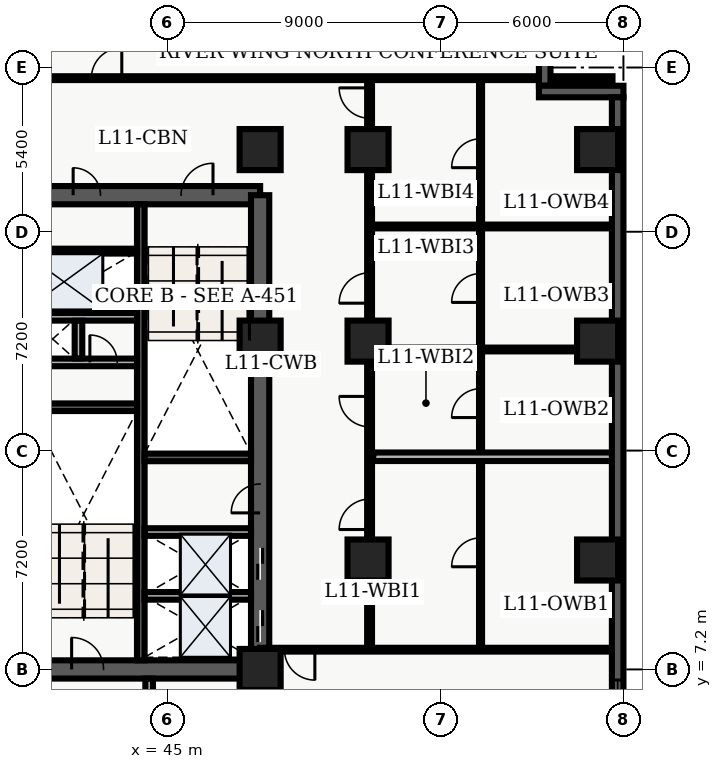
"""IFC4 building model, lengths in metres.
Left out: names, types, materials, properties, quantities, classifications, styles, units other than length and angle.
Written with IfcOpenShell. Run it as: python <this file> out.ifc"""

import sys

from ifc_helpers import new_model, entity, si_unit, converted_unit, direction, frame, origin_with_axes, origin_2d_with_axis, place, context, subcontext, project, spatial, polyline, rectangle, outline, extrude, element, fill, save


model = new_model("IFC4")
c1 = context("Model", 3, precision=1e-05, world=origin_with_axes(), true_north=direction((0.0, 1.0)))
c2 = subcontext(c1, "Body", "Model", "MODEL_VIEW")
j1 = project(units=[si_unit("LENGTHUNIT", "METRE"), converted_unit("PLANEANGLEUNIT", "DEGREE", entity("IfcPlaneAngleMeasure", 0.017), si_unit("PLANEANGLEUNIT", "RADIAN"), dimensions=[0, 0, 0, 0, 0, 0, 0])], contexts=[c1])
p1 = place(None, origin_with_axes())
s1 = spatial("IfcSite", under=j1, at=p1, CompositionType="ELEMENT")
p2 = place(p1, origin_with_axes())
s2 = spatial("IfcBuilding", under=s1, at=p2, CompositionType="ELEMENT")
p3 = place(p2, frame((0.0, 0.0, 48.3), z_axis=(0.0, 0.0, 1.0), x_axis=(1.0, 0.0, 0.0)))
s3 = spatial("IfcBuildingStorey", under=s2, at=p3, CompositionType="ELEMENT", Elevation=48.3)
p4 = place(p3, frame((40.2, 7.2, 0.0), z_axis=(0.0, 0.0, 1.0), x_axis=(1.0, 0.0, 0.0)))
e1 = element("IfcWall", 1, at=p4, inside=s3, PredefinedType="SHEAR", context=c2, shape_type="SweptSolid", body=[
    extrude(outline(polyline([(0.0, -0.3), (7.85, -0.3), (7.85, 0.3), (0.0, 0.3), (0.0, -0.3)])), origin_with_axes(), (0.0, 0.0, 1.0), 3.66),
])
p5 = place(p4, frame((2.175, 0.0, 0.0), z_axis=(0.0, 0.0, 1.0), x_axis=(1.0, 0.0, 0.0)))
e2 = element("IfcOpeningElement", 2, at=p5, cuts=e1, PredefinedType="OPENING", context=c2, shape_type="SweptSolid", body=[
    extrude(rectangle(XDim=1.05, YDim=0.62, at=origin_2d_with_axis()), origin_with_axes(), (0.0, 0.0, 1.0), 2.15),
])
p6 = place(p3, frame((40.2, 22.8, 0.0), z_axis=(0.0, 0.0, 1.0), x_axis=(1.0, 0.0, 0.0)))
e3 = element("IfcWall", 3, at=p6, inside=s3, PredefinedType="SHEAR", context=c2, shape_type="SweptSolid", body=[
    extrude(outline(polyline([(0.0, -0.3), (7.85, -0.3), (7.85, 0.3), (0.0, 0.3), (0.0, -0.3)])), origin_with_axes(), (0.0, 0.0, 1.0), 3.66),
])
p7 = place(p6, frame((5.775, 0.0, 0.0), z_axis=(0.0, 0.0, 1.0), x_axis=(1.0, 0.0, 0.0)))
e4 = element("IfcOpeningElement", 4, at=p7, cuts=e3, PredefinedType="OPENING", context=c2, shape_type="SweptSolid", body=[
    extrude(rectangle(XDim=1.05, YDim=0.62, at=origin_2d_with_axis()), origin_with_axes(), (0.0, 0.0, 1.0), 2.15),
])
p8 = place(p6, frame((2.15, 0.0, 0.0), z_axis=(0.0, 0.0, 1.0), x_axis=(1.0, 0.0, 0.0)))
e5 = element("IfcOpeningElement", 5, at=p8, cuts=e3, PredefinedType="OPENING", context=c2, shape_type="SweptSolid", body=[
    extrude(rectangle(XDim=0.9, YDim=0.62, at=origin_2d_with_axis()), origin_with_axes(), (0.0, 0.0, 1.0), 2.15),
])
p9 = place(p3, frame((48.05, 7.2, 0.0), z_axis=(0.0, 0.0, 1.0), x_axis=(0.0, 1.0, 0.0)))
e6 = element("IfcWall", 6, at=p9, inside=s3, PredefinedType="SHEAR", context=c2, shape_type="SweptSolid", body=[
    extrude(outline(polyline([(0.0, -0.3), (15.6, -0.3), (15.6, 0.3), (0.0, 0.3), (0.0, -0.3)])), origin_with_axes(), (0.0, 0.0, 1.0), 3.66),
])
p10 = place(p9, frame((1.425, 0.0, 0.0), z_axis=(0.0, 0.0, 1.0), x_axis=(1.0, 0.0, 0.0)))
e7 = element("IfcOpeningElement", 7, at=p10, cuts=e6, PredefinedType="OPENING", context=c2, shape_type="SweptSolid", body=[
    extrude(rectangle(XDim=1.05, YDim=0.62, at=origin_2d_with_axis()), origin_with_axes(), (0.0, 0.0, 1.0), 2.15),
])
p11 = place(p9, frame((3.475, 0.0, 0.0), z_axis=(0.0, 0.0, 1.0), x_axis=(1.0, 0.0, 0.0)))
e8 = element("IfcOpeningElement", 8, at=p11, cuts=e6, PredefinedType="OPENING", context=c2, shape_type="SweptSolid", body=[
    extrude(rectangle(XDim=1.05, YDim=0.62, at=origin_2d_with_axis()), origin_with_axes(), (0.0, 0.0, 1.0), 2.15),
])
p12 = place(p9, frame((5.625, 0.0, 0.0), z_axis=(0.0, 0.0, 1.0), x_axis=(1.0, 0.0, 0.0)))
e9 = element("IfcOpeningElement", 9, at=p12, cuts=e6, PredefinedType="OPENING", context=c2, shape_type="SweptSolid", body=[
    extrude(rectangle(XDim=0.95, YDim=0.62, at=origin_2d_with_axis()), origin_with_axes(), (0.0, 0.0, 1.0), 2.15),
])
p13 = place(p3, frame((44.125, 7.5, 0.0), z_axis=(0.0, 0.0, 1.0), x_axis=(0.0, 1.0, 0.0)))
e10 = element("IfcWall", 10, at=p13, inside=s3, PredefinedType="SHEAR", context=c2, shape_type="SweptSolid", body=[
    extrude(outline(polyline([(0.0, -0.125), (15.0, -0.125), (15.0, 0.125), (0.0, 0.125), (0.0, -0.125)])), origin_with_axes(), (0.0, 0.0, 1.0), 3.66),
])
for number, where, z_axis, x_axis in (
    (11, (40.5, 15.825, 0.0), (0.0, 0.0, 1.0), (1.0, 0.0, 0.0)),
    (12, (44.25, 14.175, 0.0), (0.0, 0.0, 1.0), (1.0, 0.0, 0.0)),
):
    element("IfcWall", number, at=place(p3, frame(where, z_axis=z_axis, x_axis=x_axis)), inside=s3, PredefinedType="SHEAR", context=c2, shape_type="SweptSolid", body=[
        extrude(outline(polyline([(0.0, -0.125), (3.5, -0.125), (3.5, 0.125), (0.0, 0.125), (0.0, -0.125)])), origin_with_axes(), (0.0, 0.0, 1.0), 3.66),
    ])
p14 = place(p3, frame((40.5, 17.3, 0.0), z_axis=(0.0, 0.0, 1.0), x_axis=(1.0, 0.0, 0.0)))
e13 = element("IfcWall", 13, at=p14, inside=s3, PredefinedType="SOLIDWALL", context=c2, shape_type="SweptSolid", body=[
    extrude(outline(polyline([(0.0, -0.125), (3.5, -0.125), (3.5, 0.125), (0.0, 0.125), (0.0, -0.125)])), origin_with_axes(), (0.0, 0.0, 1.0), 2.7),
])
p15 = place(p14, frame((2.4, 0.0, 0.0), z_axis=(0.0, 0.0, 1.0), x_axis=(1.0, 0.0, 0.0)))
e14 = element("IfcOpeningElement", 14, at=p15, cuts=e13, PredefinedType="OPENING", context=c2, shape_type="SweptSolid", body=[
    extrude(rectangle(XDim=0.9, YDim=0.27, at=origin_2d_with_axis()), origin_with_axes(), (0.0, 0.0, 1.0), 2.15),
])
p16 = place(p3, frame((40.5, 18.8, 0.0), z_axis=(0.0, 0.0, 1.0), x_axis=(1.0, 0.0, 0.0)))
e15 = element("IfcWall", 15, at=p16, inside=s3, PredefinedType="SOLIDWALL", context=c2, shape_type="SweptSolid", body=[
    extrude(outline(polyline([(0.0, -0.125), (3.5, -0.125), (3.5, 0.125), (0.0, 0.125), (0.0, -0.125)])), origin_with_axes(), (0.0, 0.0, 1.0), 2.7),
])
p17 = place(p3, frame((42.075, 17.43, 0.0), z_axis=(0.0, 0.0, 1.0), x_axis=(0.0, 1.0, 0.0)))
e16 = element("IfcWall", 16, at=p17, inside=s3, PredefinedType="SOLIDWALL", context=c2, shape_type="SweptSolid", body=[
    extrude(outline(polyline([(0.0, -0.125), (1.24, -0.125), (1.24, 0.125), (0.0, 0.125), (0.0, -0.125)])), origin_with_axes(), (0.0, 0.0, 1.0), 2.7),
])
p18 = place(p3, frame((44.4, 3.1, 0.0), z_axis=(0.0, 0.0, 1.0), x_axis=(0.0, 1.0, 0.0)))
e17 = element("IfcWall", 17, at=p18, inside=s3, PredefinedType="SOLIDWALL", context=c2, shape_type="SweptSolid", body=[
    extrude(outline(polyline([(0.0, -0.125), (3.8, -0.125), (3.8, 0.125), (0.0, 0.125), (0.0, -0.125)])), origin_with_axes(), (0.0, 0.0, 1.0), 2.7),
])
for number, where, z_axis, x_axis in (
    (18, (48.05, 7.2, 0.0), (0.0, 0.0, 1.0), (1.0, 0.0, 0.0)),
    (19, (48.05, 18.0, 0.0), (0.0, 0.0, 1.0), (1.0, 0.0, 0.0)),
    (20, (48.05, 24.3, 0.0), (0.0, 0.0, 1.0), (1.0, 0.0, 0.0)),
    (21, (51.6, 10.8, 0.0), (0.0, 0.0, 1.0), (1.0, 0.0, 0.0)),
    (22, (51.6, 18.0, 0.0), (0.0, 0.0, 1.0), (1.0, 0.0, 0.0)),
    (23, (51.6, 24.3, 0.0), (0.0, 0.0, 1.0), (1.0, 0.0, 0.0)),
    (24, (59.15, 10.8, 0.0), (0.0, 0.0, 1.0), (1.0, 0.0, 0.0)),
    (25, (59.15, 18.0, 0.0), (0.0, 0.0, 1.0), (1.0, 0.0, 0.0)),
    (26, (59.15, 24.3, 0.0), (0.0, 0.0, 1.0), (1.0, 0.0, 0.0)),
):
    element("IfcColumn", number, at=place(p3, frame(where, z_axis=z_axis, x_axis=x_axis)), inside=s3, PredefinedType="COLUMN", context=c2, shape_type="SweptSolid", body=[
        extrude(rectangle(XDim=1.35, YDim=1.35, at=origin_2d_with_axis()), origin_with_axes(), (0.0, 0.0, 1.0), 3.9),
    ])
p19 = place(p3, frame((40.5, 20.96, 0.0), z_axis=(0.0, 0.0, 1.0), x_axis=(1.0, 0.0, 0.0)))
e27 = element("IfcWall", 27, at=p19, inside=s3, PredefinedType="PARTITIONING", context=c2, shape_type="SweptSolid", body=[
    extrude(outline(polyline([(0.0, -0.08), (3.5, -0.08), (3.5, 0.08), (0.0, 0.08), (0.0, -0.08)])), origin_with_axes(), (0.0, 0.0, 1.0), 2.7),
])
for number, where, z_axis, x_axis in (
    (28, (44.25, 9.62, 0.0), (0.0, 0.0, 1.0), (1.0, 0.0, 0.0)),
    (29, (44.25, 11.72, 0.0), (0.0, 0.0, 1.0), (1.0, 0.0, 0.0)),
):
    element("IfcWall", number, at=place(p3, frame(where, z_axis=z_axis, x_axis=x_axis)), inside=s3, PredefinedType="SOLIDWALL", context=c2, shape_type="SweptSolid", body=[
        extrude(outline(polyline([(0.0, -0.125), (3.5, -0.125), (3.5, 0.125), (0.0, 0.125), (0.0, -0.125)])), origin_with_axes(), (0.0, 0.0, 1.0), 2.7),
    ])
p20 = place(p3, frame((51.65, 7.85, 0.0), z_axis=(0.0, 0.0, 1.0), x_axis=(0.0, 1.0, 0.0)))
e30 = element("IfcWall", 30, at=p20, inside=s3, PredefinedType="PARTITIONING", context=c2, shape_type="SweptSolid", body=[
    extrude(outline(polyline([(0.0, -0.08), (18.8, -0.08), (18.8, 0.08), (0.0, 0.08), (0.0, -0.08)])), origin_with_axes(), (0.0, 0.0, 1.0), 2.7),
])
p21 = place(p20, frame((4.453, 0.0, 0.0), z_axis=(0.0, 0.0, 1.0), x_axis=(1.0, 0.0, 0.0)))
e31 = element("IfcOpeningElement", 31, at=p21, cuts=e30, PredefinedType="OPENING", context=c2, shape_type="SweptSolid", body=[
    extrude(rectangle(XDim=1.0, YDim=0.18, at=origin_2d_with_axis()), origin_with_axes(), (0.0, 0.0, 1.0), 2.15),
])
p22 = place(p20, frame((7.831, 0.0, 0.0), z_axis=(0.0, 0.0, 1.0), x_axis=(1.0, 0.0, 0.0)))
e32 = element("IfcOpeningElement", 32, at=p22, cuts=e30, PredefinedType="OPENING", context=c2, shape_type="SweptSolid", body=[
    extrude(rectangle(XDim=1.0, YDim=0.18, at=origin_2d_with_axis()), origin_with_axes(), (0.0, 0.0, 1.0), 2.15),
])
p23 = place(p20, frame((11.898, 0.0, 0.0), z_axis=(0.0, 0.0, 1.0), x_axis=(1.0, 0.0, 0.0)))
e33 = element("IfcOpeningElement", 33, at=p23, cuts=e30, PredefinedType="OPENING", context=c2, shape_type="SweptSolid", body=[
    extrude(rectangle(XDim=1.0, YDim=0.18, at=origin_2d_with_axis()), origin_with_axes(), (0.0, 0.0, 1.0), 2.15),
])
p24 = place(p20, frame((17.98, 0.0, 0.0), z_axis=(0.0, 0.0, 1.0), x_axis=(1.0, 0.0, 0.0)))
e34 = element("IfcOpeningElement", 34, at=p24, cuts=e30, PredefinedType="OPENING", context=c2, shape_type="SweptSolid", body=[
    extrude(rectangle(XDim=1.0, YDim=0.18, at=origin_2d_with_axis()), origin_with_axes(), (0.0, 0.0, 1.0), 2.15),
])
p25 = place(p3, frame((59.64, 7.85, 0.0), z_axis=(0.0, 0.0, 1.0), x_axis=(-1.0, 0.0, 0.0)))
e35 = element("IfcWall", 35, at=p25, inside=s3, PredefinedType="PARTITIONING", context=c2, shape_type="SweptSolid", body=[
    extrude(outline(polyline([(0.0, -0.062), (11.59, -0.062), (11.59, 0.062), (0.0, 0.062), (0.0, -0.062)])), origin_with_axes(), (0.0, 0.0, 1.0), 2.7),
])
p26 = place(p25, frame((10.29, 0.0, 0.0), z_axis=(0.0, 0.0, 1.0), x_axis=(1.0, 0.0, 0.0)))
e36 = element("IfcOpeningElement", 36, at=p26, cuts=e35, PredefinedType="OPENING", context=c2, shape_type="SweptSolid", body=[
    extrude(rectangle(XDim=1.0, YDim=0.145, at=origin_2d_with_axis()), origin_with_axes(), (0.0, 0.0, 1.0), 2.15),
])
p27 = place(p3, frame((38.76, 26.65, 0.0), z_axis=(0.0, 0.0, 1.0), x_axis=(1.0, 0.0, 0.0)))
e37 = element("IfcWall", 37, at=p27, inside=s3, PredefinedType="PARTITIONING", context=c2, shape_type="SweptSolid", body=[
    extrude(outline(polyline([(0.0, -0.062), (20.88, -0.062), (20.88, 0.062), (0.0, 0.062), (0.0, -0.062)])), origin_with_axes(), (0.0, 0.0, 1.0), 2.7),
])
p28 = place(p27, frame((4.24, 0.0, 0.0), z_axis=(0.0, 0.0, 1.0), x_axis=(1.0, 0.0, 0.0)))
e38 = element("IfcOpeningElement", 38, at=p28, cuts=e37, PredefinedType="OPENING", context=c2, shape_type="SweptSolid", body=[
    extrude(rectangle(XDim=1.0, YDim=0.145, at=origin_2d_with_axis()), origin_with_axes(), (0.0, 0.0, 1.0), 2.15),
])
p29 = place(p3, frame((55.3, 7.98, 0.0), z_axis=(0.0, 0.0, 1.0), x_axis=(0.0, 1.0, 0.0)))
e39 = element("IfcWall", 39, at=p29, inside=s3, PredefinedType="PARTITIONING", context=c2, shape_type="SweptSolid", body=[
    extrude(outline(polyline([(0.0, -0.05), (18.54, -0.05), (18.54, 0.05), (0.0, 0.05), (0.0, -0.05)])), origin_with_axes(), (0.0, 0.0, 1.0), 2.7),
])
p30 = place(p29, frame((3.073, 0.0, 0.0), z_axis=(0.0, 0.0, 1.0), x_axis=(1.0, 0.0, 0.0)))
e40 = element("IfcOpeningElement", 40, at=p30, cuts=e39, PredefinedType="OPENING", context=c2, shape_type="SweptSolid", body=[
    extrude(rectangle(XDim=0.95, YDim=0.12, at=origin_2d_with_axis()), origin_with_axes(), (0.0, 0.0, 1.0), 2.15),
])
p31 = place(p29, frame((7.981, 0.0, 0.0), z_axis=(0.0, 0.0, 1.0), x_axis=(1.0, 0.0, 0.0)))
e41 = element("IfcOpeningElement", 41, at=p31, cuts=e39, PredefinedType="OPENING", context=c2, shape_type="SweptSolid", body=[
    extrude(rectangle(XDim=0.95, YDim=0.12, at=origin_2d_with_axis()), origin_with_axes(), (0.0, 0.0, 1.0), 2.15),
])
p32 = place(p29, frame((11.768, 0.0, 0.0), z_axis=(0.0, 0.0, 1.0), x_axis=(1.0, 0.0, 0.0)))
e42 = element("IfcOpeningElement", 42, at=p32, cuts=e39, PredefinedType="OPENING", context=c2, shape_type="SweptSolid", body=[
    extrude(rectangle(XDim=0.95, YDim=0.12, at=origin_2d_with_axis()), origin_with_axes(), (0.0, 0.0, 1.0), 2.15),
])
p33 = place(p29, frame((16.201, 0.0, 0.0), z_axis=(0.0, 0.0, 1.0), x_axis=(1.0, 0.0, 0.0)))
e43 = element("IfcOpeningElement", 43, at=p33, cuts=e39, PredefinedType="OPENING", context=c2, shape_type="SweptSolid", body=[
    extrude(rectangle(XDim=0.95, YDim=0.12, at=origin_2d_with_axis()), origin_with_axes(), (0.0, 0.0, 1.0), 2.15),
])
p34 = place(p3, frame((51.77, 14.196, 0.0), z_axis=(0.0, 0.0, 1.0), x_axis=(1.0, 0.0, 0.0)))
e44 = element("IfcWall", 44, at=p34, inside=s3, PredefinedType="PARTITIONING", context=c2, shape_type="SweptSolid", body=[
    extrude(outline(polyline([(0.0, -0.14), (7.855, -0.14), (7.855, 0.14), (0.0, 0.14), (0.0, -0.14)])), origin_with_axes(), (0.0, 0.0, 1.0), 2.7),
])
for number, where, z_axis, x_axis in (
    (45, (51.77, 17.725, 0.0), (0.0, 0.0, 1.0), (1.0, 0.0, 0.0)),
    (46, (51.77, 21.771, 0.0), (0.0, 0.0, 1.0), (1.0, 0.0, 0.0)),
):
    element("IfcWall", number, at=place(p3, frame(where, z_axis=z_axis, x_axis=x_axis)), inside=s3, PredefinedType="PARTITIONING", context=c2, shape_type="SweptSolid", body=[
        extrude(outline(polyline([(0.0, -0.062), (7.855, -0.062), (7.855, 0.062), (0.0, 0.062), (0.0, -0.062)])), origin_with_axes(), (0.0, 0.0, 1.0), 2.7),
    ])
p35 = place(p3, frame((57.41, 28.42, 0.0), z_axis=(0.0, 0.0, 1.0), x_axis=(0.0, -1.0, 0.0)))
e47 = element("IfcWall", 47, at=p35, inside=s3, PredefinedType="SOLIDWALL", context=c2, shape_type="SweptSolid", body=[
    extrude(outline(polyline([(0.0, -0.19), (2.02, -0.19), (2.02, 0.19), (0.0, 0.19), (0.0, -0.19)])), origin_with_axes(), (0.0, 0.0, 1.0), 3.66),
])
p36 = place(p3, frame((57.22, 26.21, 0.0), z_axis=(0.0, 0.0, 1.0), x_axis=(1.0, 0.0, 0.0)))
e48 = element("IfcWall", 48, at=p36, inside=s3, PredefinedType="SOLIDWALL", context=c2, shape_type="SweptSolid", body=[
    extrude(outline(polyline([(0.0, -0.19), (2.78, -0.19), (2.78, 0.19), (0.0, 0.19), (0.0, -0.19)])), origin_with_axes(), (0.0, 0.0, 1.0), 3.66),
])
p37 = place(p3, frame((59.81, 26.02, 0.0), z_axis=(0.0, 0.0, 1.0), x_axis=(0.0, -1.0, 0.0)))
e49 = element("IfcWall", 49, at=p37, inside=s3, PredefinedType="SOLIDWALL", context=c2, shape_type="SweptSolid", body=[
    extrude(outline(polyline([(0.0, -0.19), (23.62, -0.19), (23.62, 0.19), (0.0, 0.19), (0.0, -0.19)])), origin_with_axes(), (0.0, 0.0, 1.0), 3.66),
])
p38 = place(p37, frame((20.218, 0.0, 0.45), z_axis=(0.0, 0.0, 1.0), x_axis=(1.0, 0.0, 0.0)))
e50 = element("IfcOpeningElement", 50, at=p38, cuts=e49, PredefinedType="OPENING", context=c2, shape_type="SweptSolid", body=[
    extrude(rectangle(XDim=2.1, YDim=0.4, at=origin_2d_with_axis()), origin_with_axes(), (0.0, 0.0, 1.0), 2.2),
])
p39 = place(p9, frame((1.425, 0.0, 0.0), z_axis=(0.0, 0.0, 1.0), x_axis=(1.0, 0.0, 0.0)))
e51 = element("IfcDoor", 51, at=p39, inside=s3, OperationType="SLIDING_TO_LEFT", PredefinedType="DOOR", context=c2, shape_type="SweptSolid", body=[
    extrude(rectangle(XDim=1.05, YDim=0.09, at=origin_2d_with_axis()), origin_with_axes(), (0.0, 0.0, 1.0), 2.15),
])
fill(e7, e51)
p40 = place(p9, frame((3.475, 0.0, 0.0), z_axis=(0.0, 0.0, 1.0), x_axis=(1.0, 0.0, 0.0)))
e52 = element("IfcDoor", 52, at=p40, inside=s3, OperationType="SLIDING_TO_RIGHT", PredefinedType="DOOR", context=c2, shape_type="SweptSolid", body=[
    extrude(rectangle(XDim=1.05, YDim=0.09, at=origin_2d_with_axis()), origin_with_axes(), (0.0, 0.0, 1.0), 2.15),
])
fill(e8, e52)
p41 = place(p14, frame((2.4, 0.0, 0.0), z_axis=(0.0, 0.0, 1.0), x_axis=(1.0, 0.0, 0.0)))
e53 = element("IfcDoor", 53, at=p41, inside=s3, OperationType="SINGLE_SWING_LEFT", PredefinedType="DOOR", context=c2, shape_type="SweptSolid", body=[
    extrude(rectangle(XDim=0.9, YDim=0.09, at=origin_2d_with_axis()), origin_with_axes(), (0.0, 0.0, 1.0), 2.15),
])
fill(e14, e53)
p42 = place(p4, frame((2.175, 0.0, 0.0), z_axis=(0.0, 0.0, 1.0), x_axis=(1.0, 0.0, 0.0)))
e54 = element("IfcDoor", 54, at=p42, inside=s3, OperationType="SINGLE_SWING_LEFT", PredefinedType="DOOR", context=c2, shape_type="SweptSolid", body=[
    extrude(rectangle(XDim=1.05, YDim=0.09, at=origin_2d_with_axis()), origin_with_axes(), (0.0, 0.0, 1.0), 2.15),
])
fill(e2, e54)
p43 = place(p6, frame((5.775, 0.0, 0.0), z_axis=(0.0, 0.0, 1.0), x_axis=(1.0, 0.0, 0.0)))
e55 = element("IfcDoor", 55, at=p43, inside=s3, OperationType="SINGLE_SWING_RIGHT", PredefinedType="DOOR", context=c2, shape_type="SweptSolid", body=[
    extrude(rectangle(XDim=1.05, YDim=0.09, at=origin_2d_with_axis()), origin_with_axes(), (0.0, 0.0, 1.0), 2.15),
])
fill(e4, e55)
p44 = place(p6, frame((2.15, 0.0, 0.0), z_axis=(0.0, 0.0, 1.0), x_axis=(1.0, 0.0, 0.0)))
e56 = element("IfcDoor", 56, at=p44, inside=s3, OperationType="SINGLE_SWING_LEFT", PredefinedType="DOOR", context=c2, shape_type="SweptSolid", body=[
    extrude(rectangle(XDim=0.9, YDim=0.09, at=origin_2d_with_axis()), origin_with_axes(), (0.0, 0.0, 1.0), 2.15),
])
fill(e5, e56)
p45 = place(p9, frame((5.625, 0.0, 0.0), z_axis=(0.0, 0.0, 1.0), x_axis=(1.0, 0.0, 0.0)))
e57 = element("IfcDoor", 57, at=p45, inside=s3, OperationType="SINGLE_SWING_LEFT", PredefinedType="DOOR", context=c2, shape_type="SweptSolid", body=[
    extrude(rectangle(XDim=0.95, YDim=0.09, at=origin_2d_with_axis()), origin_with_axes(), (0.0, 0.0, 1.0), 2.15),
])
fill(e9, e57)
p46 = place(p25, frame((10.29, 0.0, 0.0), z_axis=(0.0, 0.0, 1.0), x_axis=(1.0, 0.0, 0.0)))
e58 = element("IfcDoor", 58, at=p46, inside=s3, OperationType="SINGLE_SWING_LEFT", PredefinedType="DOOR", context=c2, shape_type="SweptSolid", body=[
    extrude(rectangle(XDim=1.0, YDim=0.075, at=origin_2d_with_axis()), origin_with_axes(), (0.0, 0.0, 1.0), 2.15),
])
fill(e36, e58)
p47 = place(p27, frame((4.24, 0.0, 0.0), z_axis=(0.0, 0.0, 1.0), x_axis=(1.0, 0.0, 0.0)))
e59 = element("IfcDoor", 59, at=p47, inside=s3, OperationType="SINGLE_SWING_RIGHT", PredefinedType="DOOR", context=c2, shape_type="SweptSolid", body=[
    extrude(rectangle(XDim=1.0, YDim=0.075, at=origin_2d_with_axis()), origin_with_axes(), (0.0, 0.0, 1.0), 2.15),
])
fill(e38, e59)
p48 = place(p29, frame((3.073, 0.0, 0.0), z_axis=(0.0, 0.0, 1.0), x_axis=(1.0, 0.0, 0.0)))
e60 = element("IfcDoor", 60, at=p48, inside=s3, OperationType="SINGLE_SWING_LEFT", PredefinedType="DOOR", context=c2, shape_type="SweptSolid", body=[
    extrude(rectangle(XDim=0.95, YDim=0.06, at=origin_2d_with_axis()), origin_with_axes(), (0.0, 0.0, 1.0), 2.15),
])
fill(e40, e60)
p49 = place(p20, frame((4.453, 0.0, 0.0), z_axis=(0.0, 0.0, 1.0), x_axis=(1.0, 0.0, 0.0)))
e61 = element("IfcDoor", 61, at=p49, inside=s3, OperationType="SINGLE_SWING_LEFT", PredefinedType="DOOR", context=c2, shape_type="SweptSolid", body=[
    extrude(rectangle(XDim=1.0, YDim=0.09, at=origin_2d_with_axis()), origin_with_axes(), (0.0, 0.0, 1.0), 2.15),
])
fill(e31, e61)
p50 = place(p29, frame((7.981, 0.0, 0.0), z_axis=(0.0, 0.0, 1.0), x_axis=(1.0, 0.0, 0.0)))
e62 = element("IfcDoor", 62, at=p50, inside=s3, OperationType="SINGLE_SWING_LEFT", PredefinedType="DOOR", context=c2, shape_type="SweptSolid", body=[
    extrude(rectangle(XDim=0.95, YDim=0.06, at=origin_2d_with_axis()), origin_with_axes(), (0.0, 0.0, 1.0), 2.15),
])
fill(e41, e62)
p51 = place(p20, frame((7.831, 0.0, 0.0), z_axis=(0.0, 0.0, 1.0), x_axis=(1.0, 0.0, 0.0)))
e63 = element("IfcDoor", 63, at=p51, inside=s3, OperationType="SINGLE_SWING_RIGHT", PredefinedType="DOOR", context=c2, shape_type="SweptSolid", body=[
    extrude(rectangle(XDim=1.0, YDim=0.09, at=origin_2d_with_axis()), origin_with_axes(), (0.0, 0.0, 1.0), 2.15),
])
fill(e32, e63)
p52 = place(p29, frame((11.768, 0.0, 0.0), z_axis=(0.0, 0.0, 1.0), x_axis=(1.0, 0.0, 0.0)))
e64 = element("IfcDoor", 64, at=p52, inside=s3, OperationType="SINGLE_SWING_LEFT", PredefinedType="DOOR", context=c2, shape_type="SweptSolid", body=[
    extrude(rectangle(XDim=0.95, YDim=0.06, at=origin_2d_with_axis()), origin_with_axes(), (0.0, 0.0, 1.0), 2.15),
])
fill(e42, e64)
p53 = place(p20, frame((11.898, 0.0, 0.0), z_axis=(0.0, 0.0, 1.0), x_axis=(1.0, 0.0, 0.0)))
e65 = element("IfcDoor", 65, at=p53, inside=s3, OperationType="SINGLE_SWING_LEFT", PredefinedType="DOOR", context=c2, shape_type="SweptSolid", body=[
    extrude(rectangle(XDim=1.0, YDim=0.09, at=origin_2d_with_axis()), origin_with_axes(), (0.0, 0.0, 1.0), 2.15),
])
fill(e33, e65)
p54 = place(p29, frame((16.201, 0.0, 0.0), z_axis=(0.0, 0.0, 1.0), x_axis=(1.0, 0.0, 0.0)))
e66 = element("IfcDoor", 66, at=p54, inside=s3, OperationType="SINGLE_SWING_LEFT", PredefinedType="DOOR", context=c2, shape_type="SweptSolid", body=[
    extrude(rectangle(XDim=0.95, YDim=0.06, at=origin_2d_with_axis()), origin_with_axes(), (0.0, 0.0, 1.0), 2.15),
])
fill(e43, e66)
p55 = place(p20, frame((17.98, 0.0, 0.0), z_axis=(0.0, 0.0, 1.0), x_axis=(1.0, 0.0, 0.0)))
e67 = element("IfcDoor", 67, at=p55, inside=s3, OperationType="SINGLE_SWING_RIGHT", PredefinedType="DOOR", context=c2, shape_type="SweptSolid", body=[
    extrude(rectangle(XDim=1.0, YDim=0.09, at=origin_2d_with_axis()), origin_with_axes(), (0.0, 0.0, 1.0), 2.15),
])
fill(e34, e67)
p56 = place(p37, frame((20.218, 0.0, 0.45), z_axis=(0.0, 0.0, 1.0), x_axis=(1.0, 0.0, 0.0)))
e68 = element("IfcWindow", 68, at=p56, inside=s3, PredefinedType="WINDOW", context=c2, shape_type="SweptSolid", body=[
    extrude(rectangle(XDim=2.1, YDim=0.09, at=origin_2d_with_axis()), origin_with_axes(), (0.0, 0.0, 1.0), 2.2),
])
fill(e50, e68)
save(model, sys.argv[1])
